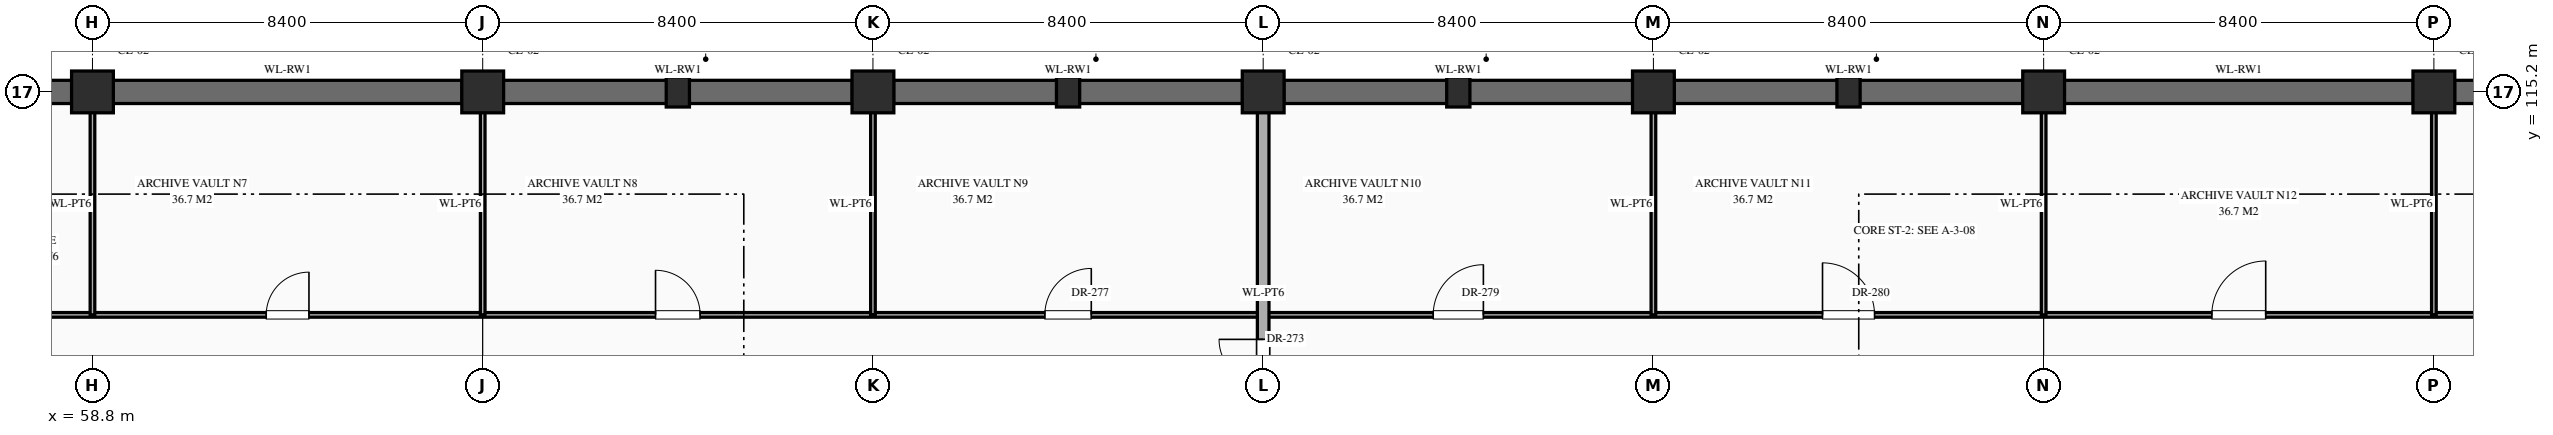
"""IFC4 building model, lengths in metres.
Left out: names, types, materials, properties, quantities, classifications, styles, units other than length and angle.
Written with IfcOpenShell. Run it as: python <this file> out.ifc"""

import sys

from ifc_helpers import new_model, si_unit, direction, frame, frame_2d, origin, origin_2d, place, context, subcontext, project, spatial, rectangle, extrude, element, fill, save


model = new_model("IFC4")
c1 = context("Model", 3, precision=1e-05, world=origin(), true_north=direction((0.0, 1.0)))
c2 = subcontext(c1, "Body", "Model", "MODEL_VIEW")
j1 = project(units=[si_unit("LENGTHUNIT", "METRE"), si_unit("PLANEANGLEUNIT", "RADIAN")], contexts=[c1])
p1 = place(None, origin())
s1 = spatial("IfcSite", under=j1, at=p1, CompositionType="ELEMENT")
p2 = place(p1, origin())
s2 = spatial("IfcBuilding", under=s1, at=p2, CompositionType="ELEMENT")
p3 = place(p2, frame((0.0, 0.0, -10.2)))
s3 = spatial("IfcBuildingStorey", under=s2, at=p3, CompositionType="ELEMENT", Elevation=-10.2)
for number, where, z_axis, x_axis in (
    (1, (58.8, 115.2, 0.0), (0.0, 0.0, 1.0), (1.0, 0.0, 0.0)),
    (2, (67.2, 115.2, 0.0), (0.0, 0.0, 1.0), (1.0, 0.0, 0.0)),
    (3, (75.6, 115.2, 0.0), (0.0, 0.0, 1.0), (1.0, 0.0, 0.0)),
    (4, (84.0, 115.2, 0.0), (0.0, 0.0, 1.0), (1.0, 0.0, 0.0)),
    (5, (92.4, 115.2, 0.0), (0.0, 0.0, 1.0), (1.0, 0.0, 0.0)),
    (6, (100.8, 115.2, 0.0), (0.0, 0.0, 1.0), (1.0, 0.0, 0.0)),
    (7, (109.2, 115.2, 0.0), (0.0, 0.0, 1.0), (1.0, 0.0, 0.0)),
):
    element("IfcColumn", number, at=place(p3, frame(where, z_axis=z_axis, x_axis=x_axis)), inside=s3, PredefinedType="COLUMN", context=c2, shape_type="SweptSolid", body=[
        extrude(rectangle(XDim=0.9, YDim=0.9, at=origin_2d()), origin(), (0.0, 0.0, 1.0), 4.8),
    ])
for number, where, z_axis, x_axis in (
    (8, (71.4, 115.2, 0.0), (0.0, 0.0, 1.0), (1.0, 0.0, 0.0)),
    (9, (79.8, 115.2, 0.0), (0.0, 0.0, 1.0), (1.0, 0.0, 0.0)),
    (10, (88.2, 115.2, 0.0), (0.0, 0.0, 1.0), (1.0, 0.0, 0.0)),
    (11, (96.6, 115.2, 0.0), (0.0, 0.0, 1.0), (1.0, 0.0, 0.0)),
):
    element("IfcColumn", number, at=place(p3, frame(where, z_axis=z_axis, x_axis=x_axis)), inside=s3, PredefinedType="PILASTER", context=c2, shape_type="SweptSolid", body=[
        extrude(rectangle(XDim=0.5, YDim=0.65, at=origin_2d()), origin(), (0.0, 0.0, 1.0), 4.8),
    ])
p4 = place(p3, frame((50.845, 115.2, 0.0), z_axis=(0.0, 0.0, 1.0), x_axis=(1.0, 0.0, 0.0)))
e12 = element("IfcWall", 12, at=p4, inside=s3, PredefinedType="USERDEFINED", context=c2, shape_type="SweptSolid", body=[
    extrude(rectangle(XDim=7.51, YDim=0.5, at=frame_2d((3.755, 0.0))), origin(), (0.0, 0.0, 1.0), 4.48),
])
p5 = place(p3, frame((59.245, 115.2, 0.0), z_axis=(0.0, 0.0, 1.0), x_axis=(1.0, 0.0, 0.0)))
e13 = element("IfcWall", 13, at=p5, inside=s3, PredefinedType="USERDEFINED", context=c2, shape_type="SweptSolid", body=[
    extrude(rectangle(XDim=7.51, YDim=0.5, at=frame_2d((3.755, 0.0))), origin(), (0.0, 0.0, 1.0), 4.48),
])
for number, where, z_axis, x_axis in (
    (14, (67.645, 115.2, 0.0), (0.0, 0.0, 1.0), (1.0, 0.0, 0.0)),
    (15, (76.045, 115.2, 0.0), (0.0, 0.0, 1.0), (1.0, 0.0, 0.0)),
    (16, (84.445, 115.2, 0.0), (0.0, 0.0, 1.0), (1.0, 0.0, 0.0)),
    (17, (92.845, 115.2, 0.0), (0.0, 0.0, 1.0), (1.0, 0.0, 0.0)),
):
    element("IfcWall", number, at=place(p3, frame(where, z_axis=z_axis, x_axis=x_axis)), inside=s3, PredefinedType="USERDEFINED", context=c2, shape_type="SweptSolid", body=[
        extrude(rectangle(XDim=7.51, YDim=0.5, at=frame_2d((3.755, 0.0))), origin(), (0.0, 0.0, 1.0), 4.48),
    ])
p6 = place(p3, frame((101.245, 115.2, 0.0), z_axis=(0.0, 0.0, 1.0), x_axis=(1.0, 0.0, 0.0)))
e18 = element("IfcWall", 18, at=p6, inside=s3, PredefinedType="USERDEFINED", context=c2, shape_type="SweptSolid", body=[
    extrude(rectangle(XDim=7.51, YDim=0.5, at=frame_2d((3.755, 0.0))), origin(), (0.0, 0.0, 1.0), 4.48),
])
p7 = place(p3, frame((109.645, 115.2, 0.0), z_axis=(0.0, 0.0, 1.0), x_axis=(1.0, 0.0, 0.0)))
e19 = element("IfcWall", 19, at=p7, inside=s3, PredefinedType="USERDEFINED", context=c2, shape_type="SweptSolid", body=[
    extrude(rectangle(XDim=7.51, YDim=0.5, at=frame_2d((3.755, 0.0))), origin(), (0.0, 0.0, 1.0), 4.48),
])
p8 = place(p3, frame((0.04, 110.4, 0.0), z_axis=(0.0, 0.0, 1.0), x_axis=(1.0, 0.0, 0.0)))
e20 = element("IfcWall", 20, at=p8, inside=s3, PredefinedType="STANDARD", context=c2, shape_type="SweptSolid", body=[
    extrude(rectangle(XDim=167.92, YDim=0.1, at=frame_2d((83.96, 0.0))), origin(), (0.0, 0.0, 1.0), 4.48),
])
p9 = place(p8, frame((3.54, 0.0, 0.0)))
e21 = element("IfcOpeningElement", 21, at=p9, cuts=e20, PredefinedType="OPENING", context=c2, shape_type="SweptSolid", body=[
    extrude(rectangle(XDim=1.28, YDim=2.35, at=frame_2d((0.64, 1.175))), frame((0.0, 0.062, 0.0), z_axis=(0.0, -1.0, 0.0), x_axis=(1.0, 0.0, 0.0)), (0.0, 0.0, 1.0), 0.124),
])
p10 = place(p8, frame((12.09, 0.0, 0.0)))
e22 = element("IfcOpeningElement", 22, at=p10, cuts=e20, PredefinedType="OPENING", context=c2, shape_type="SweptSolid", body=[
    extrude(rectangle(XDim=0.94, YDim=2.3, at=frame_2d((0.47, 1.15))), frame((0.0, 0.062, 0.0), z_axis=(0.0, -1.0, 0.0), x_axis=(1.0, 0.0, 0.0)), (0.0, 0.0, 1.0), 0.124),
])
p11 = place(p8, frame((20.47, 0.0, 0.0)))
e23 = element("IfcOpeningElement", 23, at=p11, cuts=e20, PredefinedType="OPENING", context=c2, shape_type="SweptSolid", body=[
    extrude(rectangle(XDim=0.98, YDim=2.35, at=frame_2d((0.49, 1.175))), frame((0.0, 0.062, 0.0), z_axis=(0.0, -1.0, 0.0), x_axis=(1.0, 0.0, 0.0)), (0.0, 0.0, 1.0), 0.124),
])
p12 = place(p8, frame((28.85, 0.0, 0.0)))
e24 = element("IfcOpeningElement", 24, at=p12, cuts=e20, PredefinedType="OPENING", context=c2, shape_type="SweptSolid", body=[
    extrude(rectangle(XDim=1.02, YDim=2.4, at=frame_2d((0.51, 1.2))), frame((0.0, 0.062, 0.0), z_axis=(0.0, -1.0, 0.0), x_axis=(1.0, 0.0, 0.0)), (0.0, 0.0, 1.0), 0.124),
])
p13 = place(p8, frame((37.23, 0.0, 0.0)))
e25 = element("IfcOpeningElement", 25, at=p13, cuts=e20, PredefinedType="OPENING", context=c2, shape_type="SweptSolid", body=[
    extrude(rectangle(XDim=1.06, YDim=2.4, at=frame_2d((0.53, 1.2))), frame((0.0, 0.062, 0.0), z_axis=(0.0, -1.0, 0.0), x_axis=(1.0, 0.0, 0.0)), (0.0, 0.0, 1.0), 0.124),
])
p14 = place(p8, frame((45.59, 0.0, 0.0)))
e26 = element("IfcOpeningElement", 26, at=p14, cuts=e20, PredefinedType="OPENING", context=c2, shape_type="SweptSolid", body=[
    extrude(rectangle(XDim=1.14, YDim=2.4, at=frame_2d((0.57, 1.2))), frame((0.0, 0.062, 0.0), z_axis=(0.0, -1.0, 0.0), x_axis=(1.0, 0.0, 0.0)), (0.0, 0.0, 1.0), 0.124),
])
p15 = place(p8, frame((54.13, 0.0, 0.0)))
e27 = element("IfcOpeningElement", 27, at=p15, cuts=e20, PredefinedType="OPENING", context=c2, shape_type="SweptSolid", body=[
    extrude(rectangle(XDim=0.86, YDim=2.1, at=frame_2d((0.43, 1.05))), frame((0.0, 0.062, 0.0), z_axis=(0.0, -1.0, 0.0), x_axis=(1.0, 0.0, 0.0)), (0.0, 0.0, 1.0), 0.124),
])
p16 = place(p8, frame((62.5, 0.0, 0.0)))
e28 = element("IfcOpeningElement", 28, at=p16, cuts=e20, PredefinedType="OPENING", context=c2, shape_type="SweptSolid", body=[
    extrude(rectangle(XDim=0.92, YDim=2.15, at=frame_2d((0.46, 1.075))), frame((0.0, 0.062, 0.0), z_axis=(0.0, -1.0, 0.0), x_axis=(1.0, 0.0, 0.0)), (0.0, 0.0, 1.0), 0.124),
])
p17 = place(p8, frame((70.88, 0.0, 0.0)))
e29 = element("IfcOpeningElement", 29, at=p17, cuts=e20, PredefinedType="OPENING", context=c2, shape_type="SweptSolid", body=[
    extrude(rectangle(XDim=0.96, YDim=2.2, at=frame_2d((0.48, 1.1))), frame((0.0, 0.062, 0.0), z_axis=(0.0, -1.0, 0.0), x_axis=(1.0, 0.0, 0.0)), (0.0, 0.0, 1.0), 0.124),
])
p18 = place(p8, frame((79.26, 0.0, 0.0)))
e30 = element("IfcOpeningElement", 30, at=p18, cuts=e20, PredefinedType="OPENING", context=c2, shape_type="SweptSolid", body=[
    extrude(rectangle(XDim=1.0, YDim=2.25, at=frame_2d((0.5, 1.125))), frame((0.0, 0.062, 0.0), z_axis=(0.0, -1.0, 0.0), x_axis=(1.0, 0.0, 0.0)), (0.0, 0.0, 1.0), 0.124),
])
p19 = place(p8, frame((87.62, 0.0, 0.0)))
e31 = element("IfcOpeningElement", 31, at=p19, cuts=e20, PredefinedType="OPENING", context=c2, shape_type="SweptSolid", body=[
    extrude(rectangle(XDim=1.08, YDim=2.25, at=frame_2d((0.54, 1.125))), frame((0.0, 0.062, 0.0), z_axis=(0.0, -1.0, 0.0), x_axis=(1.0, 0.0, 0.0)), (0.0, 0.0, 1.0), 0.124),
])
p20 = place(p8, frame((96.0, 0.0, 0.0)))
e32 = element("IfcOpeningElement", 32, at=p20, cuts=e20, PredefinedType="OPENING", context=c2, shape_type="SweptSolid", body=[
    extrude(rectangle(XDim=1.12, YDim=2.25, at=frame_2d((0.56, 1.125))), frame((0.0, 0.062, 0.0), z_axis=(0.0, -1.0, 0.0), x_axis=(1.0, 0.0, 0.0)), (0.0, 0.0, 1.0), 0.124),
])
p21 = place(p8, frame((104.38, 0.0, 0.0)))
e33 = element("IfcOpeningElement", 33, at=p21, cuts=e20, PredefinedType="OPENING", context=c2, shape_type="SweptSolid", body=[
    extrude(rectangle(XDim=1.16, YDim=2.3, at=frame_2d((0.58, 1.15))), frame((0.0, 0.062, 0.0), z_axis=(0.0, -1.0, 0.0), x_axis=(1.0, 0.0, 0.0)), (0.0, 0.0, 1.0), 0.124),
])
p22 = place(p8, frame((112.76, 0.0, 0.0)))
e34 = element("IfcOpeningElement", 34, at=p22, cuts=e20, PredefinedType="OPENING", context=c2, shape_type="SweptSolid", body=[
    extrude(rectangle(XDim=1.2, YDim=2.35, at=frame_2d((0.6, 1.175))), frame((0.0, 0.062, 0.0), z_axis=(0.0, -1.0, 0.0), x_axis=(1.0, 0.0, 0.0)), (0.0, 0.0, 1.0), 0.124),
])
p23 = place(p8, frame((121.14, 0.0, 0.0)))
e35 = element("IfcOpeningElement", 35, at=p23, cuts=e20, PredefinedType="OPENING", context=c2, shape_type="SweptSolid", body=[
    extrude(rectangle(XDim=1.24, YDim=2.3, at=frame_2d((0.62, 1.15))), frame((0.0, 0.062, 0.0), z_axis=(0.0, -1.0, 0.0), x_axis=(1.0, 0.0, 0.0)), (0.0, 0.0, 1.0), 0.124),
])
p24 = place(p8, frame((129.52, 0.0, 0.0)))
e36 = element("IfcOpeningElement", 36, at=p24, cuts=e20, PredefinedType="OPENING", context=c2, shape_type="SweptSolid", body=[
    extrude(rectangle(XDim=1.28, YDim=2.35, at=frame_2d((0.64, 1.175))), frame((0.0, 0.062, 0.0), z_axis=(0.0, -1.0, 0.0), x_axis=(1.0, 0.0, 0.0)), (0.0, 0.0, 1.0), 0.124),
])
p25 = place(p8, frame((138.09, 0.0, 0.0)))
e37 = element("IfcOpeningElement", 37, at=p25, cuts=e20, PredefinedType="OPENING", context=c2, shape_type="SweptSolid", body=[
    extrude(rectangle(XDim=0.94, YDim=2.3, at=frame_2d((0.47, 1.15))), frame((0.0, 0.062, 0.0), z_axis=(0.0, -1.0, 0.0), x_axis=(1.0, 0.0, 0.0)), (0.0, 0.0, 1.0), 0.124),
])
p26 = place(p8, frame((146.47, 0.0, 0.0)))
e38 = element("IfcOpeningElement", 38, at=p26, cuts=e20, PredefinedType="OPENING", context=c2, shape_type="SweptSolid", body=[
    extrude(rectangle(XDim=0.98, YDim=2.35, at=frame_2d((0.49, 1.175))), frame((0.0, 0.062, 0.0), z_axis=(0.0, -1.0, 0.0), x_axis=(1.0, 0.0, 0.0)), (0.0, 0.0, 1.0), 0.124),
])
p27 = place(p8, frame((154.85, 0.0, 0.0)))
e39 = element("IfcOpeningElement", 39, at=p27, cuts=e20, PredefinedType="OPENING", context=c2, shape_type="SweptSolid", body=[
    extrude(rectangle(XDim=1.02, YDim=2.4, at=frame_2d((0.51, 1.2))), frame((0.0, 0.062, 0.0), z_axis=(0.0, -1.0, 0.0), x_axis=(1.0, 0.0, 0.0)), (0.0, 0.0, 1.0), 0.124),
])
p28 = place(p8, frame((163.21, 0.0, 0.0)))
e40 = element("IfcOpeningElement", 40, at=p28, cuts=e20, PredefinedType="OPENING", context=c2, shape_type="SweptSolid", body=[
    extrude(rectangle(XDim=1.06, YDim=2.4, at=frame_2d((0.53, 1.2))), frame((0.0, 0.062, 0.0), z_axis=(0.0, -1.0, 0.0), x_axis=(1.0, 0.0, 0.0)), (0.0, 0.0, 1.0), 0.124),
])
for number, where, z_axis, x_axis in (
    (41, (58.8, 110.4, 0.0), (0.0, 0.0, 1.0), (0.0, 1.0, 0.0)),
    (42, (67.2, 110.4, 0.0), (0.0, 0.0, 1.0), (0.0, 1.0, 0.0)),
    (43, (75.6, 110.4, 0.0), (0.0, 0.0, 1.0), (0.0, 1.0, 0.0)),
):
    element("IfcWall", number, at=place(p3, frame(where, z_axis=z_axis, x_axis=x_axis)), inside=s3, PredefinedType="STANDARD", context=c2, shape_type="SweptSolid", body=[
        extrude(rectangle(XDim=4.76, YDim=0.1, at=frame_2d((2.38, 0.0))), origin(), (0.0, 0.0, 1.0), 3.73),
    ])
p29 = place(p3, frame((84.0, 79.2, 0.0), z_axis=(0.0, 0.0, 1.0), x_axis=(0.0, 1.0, 0.0)))
e44 = element("IfcWall", 44, at=p29, inside=s3, PredefinedType="STANDARD", context=c2, shape_type="SweptSolid", body=[
    extrude(rectangle(XDim=35.96, YDim=0.25, at=frame_2d((17.98, 0.0))), origin(), (0.0, 0.0, 1.0), 3.73),
])
p30 = place(p29, frame((22.448, 0.0, 0.0)))
e45 = element("IfcOpeningElement", 45, at=p30, cuts=e44, PredefinedType="OPENING", context=c2, shape_type="SweptSolid", body=[
    extrude(rectangle(XDim=1.1, YDim=2.2, at=frame_2d((0.55, 1.1))), frame((0.0, 0.137, 0.0), z_axis=(0.0, -1.0, 0.0), x_axis=(1.0, 0.0, 0.0)), (0.0, 0.0, 1.0), 0.274),
])
p31 = place(p29, frame((12.502, 0.0, 0.0)))
e46 = element("IfcOpeningElement", 46, at=p31, cuts=e44, PredefinedType="OPENING", context=c2, shape_type="SweptSolid", body=[
    extrude(rectangle(XDim=1.0, YDim=2.2, at=frame_2d((0.5, 1.1))), frame((0.0, 0.137, 0.0), z_axis=(0.0, -1.0, 0.0), x_axis=(1.0, 0.0, 0.0)), (0.0, 0.0, 1.0), 0.274),
])
p32 = place(p29, frame((15.248, 0.0, 0.0)))
e47 = element("IfcOpeningElement", 47, at=p32, cuts=e44, PredefinedType="OPENING", context=c2, shape_type="SweptSolid", body=[
    extrude(rectangle(XDim=1.1, YDim=2.2, at=frame_2d((0.55, 1.1))), frame((0.0, 0.137, 0.0), z_axis=(0.0, -1.0, 0.0), x_axis=(1.0, 0.0, 0.0)), (0.0, 0.0, 1.0), 0.274),
])
p33 = place(p29, frame((29.722, 0.0, 0.0)))
e48 = element("IfcOpeningElement", 48, at=p33, cuts=e44, PredefinedType="OPENING", context=c2, shape_type="SweptSolid", body=[
    extrude(rectangle(XDim=0.95, YDim=2.15, at=frame_2d((0.475, 1.075))), frame((0.0, 0.137, 0.0), z_axis=(0.0, -1.0, 0.0), x_axis=(1.0, 0.0, 0.0)), (0.0, 0.0, 1.0), 0.274),
])
p34 = place(p29, frame((5.302, 0.0, 0.0)))
e49 = element("IfcOpeningElement", 49, at=p34, cuts=e44, PredefinedType="OPENING", context=c2, shape_type="SweptSolid", body=[
    extrude(rectangle(XDim=1.0, YDim=2.2, at=frame_2d((0.5, 1.1))), frame((0.0, 0.137, 0.0), z_axis=(0.0, -1.0, 0.0), x_axis=(1.0, 0.0, 0.0)), (0.0, 0.0, 1.0), 0.274),
])
for number, where, z_axis, x_axis in (
    (50, (92.4, 110.4, 0.0), (0.0, 0.0, 1.0), (0.0, 1.0, 0.0)),
    (51, (100.8, 110.4, 0.0), (0.0, 0.0, 1.0), (0.0, 1.0, 0.0)),
    (52, (109.2, 110.4, 0.0), (0.0, 0.0, 1.0), (0.0, 1.0, 0.0)),
):
    element("IfcWall", number, at=place(p3, frame(where, z_axis=z_axis, x_axis=x_axis)), inside=s3, PredefinedType="STANDARD", context=c2, shape_type="SweptSolid", body=[
        extrude(rectangle(XDim=4.76, YDim=0.1, at=frame_2d((2.38, 0.0))), origin(), (0.0, 0.0, 1.0), 3.73),
    ])
p35 = place(p33, origin())
e53 = element("IfcDoor", 53, at=p35, inside=s3, OperationType="SINGLE_SWING_RIGHT", PredefinedType="DOOR", context=c2, shape_type="SweptSolid", body=[
    extrude(rectangle(XDim=0.95, YDim=2.15, at=frame_2d((0.475, 1.075))), frame((0.0, 0.025, 0.0), z_axis=(0.0, -1.0, 0.0), x_axis=(1.0, 0.0, 0.0)), (0.0, 0.0, 1.0), 0.05),
])
fill(e48, e53)
p36 = place(p16, origin())
e54 = element("IfcDoor", 54, at=p36, inside=s3, OperationType="SINGLE_SWING_RIGHT", PredefinedType="DOOR", context=c2, shape_type="SweptSolid", body=[
    extrude(rectangle(XDim=0.92, YDim=2.15, at=frame_2d((0.46, 1.075))), frame((0.0, 0.025, 0.0), z_axis=(0.0, -1.0, 0.0), x_axis=(1.0, 0.0, 0.0)), (0.0, 0.0, 1.0), 0.05),
])
fill(e28, e54)
p37 = place(p17, origin())
e55 = element("IfcDoor", 55, at=p37, inside=s3, OperationType="SINGLE_SWING_LEFT", PredefinedType="DOOR", context=c2, shape_type="SweptSolid", body=[
    extrude(rectangle(XDim=0.96, YDim=2.2, at=frame_2d((0.48, 1.1))), frame((0.0, 0.025, 0.0), z_axis=(0.0, -1.0, 0.0), x_axis=(1.0, 0.0, 0.0)), (0.0, 0.0, 1.0), 0.05),
])
fill(e29, e55)
p38 = place(p18, origin())
e56 = element("IfcDoor", 56, at=p38, inside=s3, OperationType="SINGLE_SWING_RIGHT", PredefinedType="DOOR", context=c2, shape_type="SweptSolid", body=[
    extrude(rectangle(XDim=1.0, YDim=2.25, at=frame_2d((0.5, 1.125))), frame((0.0, 0.025, 0.0), z_axis=(0.0, -1.0, 0.0), x_axis=(1.0, 0.0, 0.0)), (0.0, 0.0, 1.0), 0.05),
])
fill(e30, e56)
p39 = place(p19, origin())
e57 = element("IfcDoor", 57, at=p39, inside=s3, OperationType="SINGLE_SWING_RIGHT", PredefinedType="DOOR", context=c2, shape_type="SweptSolid", body=[
    extrude(rectangle(XDim=1.08, YDim=2.25, at=frame_2d((0.54, 1.125))), frame((0.0, 0.025, 0.0), z_axis=(0.0, -1.0, 0.0), x_axis=(1.0, 0.0, 0.0)), (0.0, 0.0, 1.0), 0.05),
])
fill(e31, e57)
p40 = place(p20, origin())
e58 = element("IfcDoor", 58, at=p40, inside=s3, OperationType="SINGLE_SWING_LEFT", PredefinedType="DOOR", context=c2, shape_type="SweptSolid", body=[
    extrude(rectangle(XDim=1.12, YDim=2.25, at=frame_2d((0.56, 1.125))), frame((0.0, 0.025, 0.0), z_axis=(0.0, -1.0, 0.0), x_axis=(1.0, 0.0, 0.0)), (0.0, 0.0, 1.0), 0.05),
])
fill(e32, e58)
p41 = place(p21, origin())
e59 = element("IfcDoor", 59, at=p41, inside=s3, OperationType="SINGLE_SWING_RIGHT", PredefinedType="DOOR", context=c2, shape_type="SweptSolid", body=[
    extrude(rectangle(XDim=1.16, YDim=2.3, at=frame_2d((0.58, 1.15))), frame((0.0, 0.025, 0.0), z_axis=(0.0, -1.0, 0.0), x_axis=(1.0, 0.0, 0.0)), (0.0, 0.0, 1.0), 0.05),
])
fill(e33, e59)
save(model, sys.argv[1])
